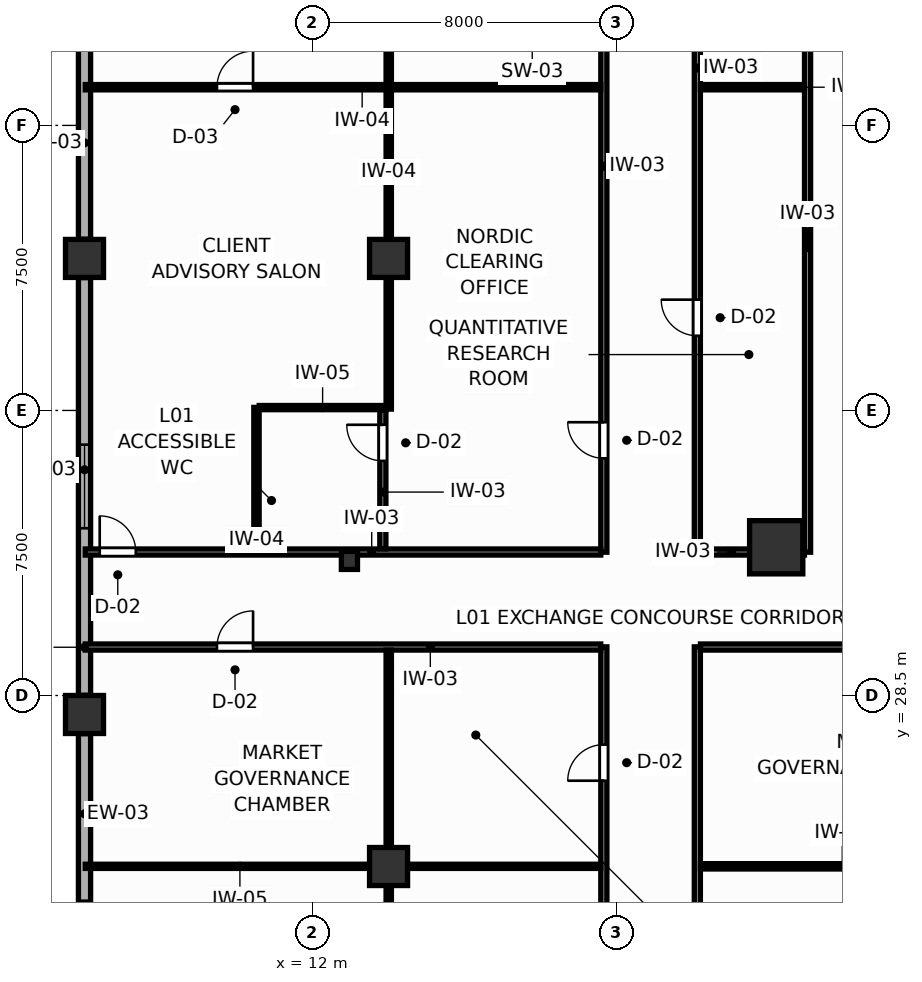
"""IFC4 building model, lengths in metres.
Left out: names, types, materials, properties, quantities, classifications, styles, units other than length and angle.
Written with IfcOpenShell. Run it as: python <this file> out.ifc"""

import sys

from ifc_helpers import new_model, si_unit, direction, frame, frame_2d, origin, origin_2d, place, context, subcontext, project, spatial, rectangle, i_section, extrude, source, transform, mapped, element, fill, save


model = new_model("IFC4")
c1 = context("Model", 3, precision=1e-05, world=origin(), true_north=direction((0.0, 1.0)))
c2 = subcontext(c1, "Body", "Model", "MODEL_VIEW")
j1 = project(units=[si_unit("LENGTHUNIT", "METRE"), si_unit("PLANEANGLEUNIT", "RADIAN")], contexts=[c1])
p1 = place(None, origin())
s1 = spatial("IfcSite", under=j1, at=p1, CompositionType="ELEMENT")
p2 = place(p1, origin())
s2 = spatial("IfcBuilding", under=s1, at=p2, CompositionType="ELEMENT")
p3 = place(p2, frame((0.0, 0.0, 4.8)))
s3 = spatial("IfcBuildingStorey", under=s2, at=p3, CompositionType="ELEMENT", Elevation=4.8)
m1 = source(origin(), c2, "Body", "SweptSolid", [
    extrude(rectangle(XDim=1.4, YDim=1.4, at=origin_2d()), origin(), (0.0, 0.0, 1.0), 4.8),
])
p4 = place(p3, frame((24.2, 32.4, 0.0), z_axis=(0.0, 0.0, 1.0), x_axis=(1.0, 0.0, 0.0)))
e1 = element("IfcColumn", 1, at=p4, inside=s3, PredefinedType="COLUMN", context=c2, shape_type="MappedRepresentation", body=[
    mapped(m1, transform((0.0, 0.0, 0.0), scale=1.0)),
])
m2 = source(origin(), c2, "Body", "SweptSolid", [
    extrude(rectangle(XDim=1.0, YDim=1.0, at=origin_2d()), origin(), (0.0, 0.0, 1.0), 4.8),
])
for number, where, z_axis, x_axis in (
    (2, (6.0, 28.0, 0.0), (0.0, 0.0, 1.0), (1.0, 0.0, 0.0)),
    (3, (6.0, 40.0, 0.0), (0.0, 0.0, 1.0), (1.0, 0.0, 0.0)),
    (4, (14.0, 24.0, 0.0), (0.0, 0.0, 1.0), (1.0, 0.0, 0.0)),
    (5, (14.0, 40.0, 0.0), (0.0, 0.0, 1.0), (1.0, 0.0, 0.0)),
):
    element("IfcColumn", number, at=place(p3, frame(where, z_axis=z_axis, x_axis=x_axis)), inside=s3, PredefinedType="COLUMN", context=c2, shape_type="MappedRepresentation", body=[
        mapped(m2, transform((0.0, 0.0, 0.0), scale=1.0)),
    ])
m3 = source(origin(), c2, "Body", "SweptSolid", [
    extrude(i_section(OverallWidth=0.424, OverallDepth=0.474, WebThickness=0.045, FlangeThickness=0.072, FilletRadius=0.015, at=origin_2d()), origin(), (0.0, 0.0, 1.0), 4.8),
])
p5 = place(p3, frame((12.97, 32.054, 0.0), z_axis=(0.0, 0.0, 1.0), x_axis=(1.0, 0.0, 0.0)))
e6 = element("IfcColumn", 6, at=p5, inside=s3, PredefinedType="COLUMN", context=c2, shape_type="MappedRepresentation", body=[
    mapped(m3, transform((0.0, 0.0, 0.0), scale=1.0)),
])
p6 = place(p3, frame((6.0, 16.505, 0.0), z_axis=(0.0, 0.0, 1.0), x_axis=(0.0, 1.0, 0.0)))
e7 = element("IfcWall", 7, at=p6, inside=s3, PredefinedType="SOLIDWALL", context=c2, shape_type="SweptSolid", body=[
    extrude(rectangle(XDim=10.99, YDim=0.32, at=frame_2d((5.495, 0.0))), origin(), (0.0, 0.0, 1.0), 3.82),
])
p7 = place(p6, frame((4.395, 0.0, 0.75)))
e8 = element("IfcOpeningElement", 8, at=p7, cuts=e7, PredefinedType="OPENING", context=c2, shape_type="SweptSolid", body=[
    extrude(rectangle(XDim=2.2, YDim=2.0, at=frame_2d((1.1, 1.0))), frame((0.0, 0.17, 0.0), z_axis=(0.0, -1.0, 0.0), x_axis=(1.0, 0.0, 0.0)), (0.0, 0.0, 1.0), 0.34),
])
p8 = place(p3, frame((6.0, 28.505, 0.0), z_axis=(0.0, 0.0, 1.0), x_axis=(0.0, 1.0, 0.0)))
e9 = element("IfcWall", 9, at=p8, inside=s3, PredefinedType="SOLIDWALL", context=c2, shape_type="SweptSolid", body=[
    extrude(rectangle(XDim=10.99, YDim=0.32, at=frame_2d((5.495, 0.0))), origin(), (0.0, 0.0, 1.0), 3.82),
])
p9 = place(p8, frame((4.395, 0.0, 0.75)))
e10 = element("IfcOpeningElement", 10, at=p9, cuts=e9, PredefinedType="OPENING", context=c2, shape_type="SweptSolid", body=[
    extrude(rectangle(XDim=2.2, YDim=2.0, at=frame_2d((1.1, 1.0))), frame((0.0, 0.17, 0.0), z_axis=(0.0, -1.0, 0.0), x_axis=(1.0, 0.0, 0.0)), (0.0, 0.0, 1.0), 0.34),
])
p10 = place(p3, frame((6.0, 40.505, 0.0), z_axis=(0.0, 0.0, 1.0), x_axis=(0.0, 1.0, 0.0)))
e11 = element("IfcWall", 11, at=p10, inside=s3, PredefinedType="SOLIDWALL", context=c2, shape_type="SweptSolid", body=[
    extrude(rectangle(XDim=9.47, YDim=0.32, at=frame_2d((4.735, 0.0))), origin(), (0.0, 0.0, 1.0), 3.82),
])
p11 = place(p10, frame((5.253, 0.0, 0.75)))
e12 = element("IfcOpeningElement", 12, at=p11, cuts=e11, PredefinedType="OPENING", context=c2, shape_type="SweptSolid", body=[
    extrude(rectangle(XDim=2.2, YDim=2.0, at=frame_2d((1.1, 1.0))), frame((0.0, 0.17, 0.0), z_axis=(0.0, -1.0, 0.0), x_axis=(1.0, 0.0, 0.0)), (0.0, 0.0, 1.0), 0.34),
])
p12 = place(p3, frame((22.125, 3.02, 0.0), z_axis=(0.0, 0.0, 1.0), x_axis=(0.0, 1.0, 0.0)))
e13 = element("IfcWall", 13, at=p12, inside=s3, PredefinedType="PARTITIONING", context=c2, shape_type="SweptSolid", body=[
    extrude(rectangle(XDim=26.76, YDim=0.16, at=frame_2d((13.38, 0.0))), origin(), (0.0, 0.0, 1.0), 4.52),
])
p13 = place(p12, frame((10.07, 0.0, 0.0)))
e14 = element("IfcOpeningElement", 14, at=p13, cuts=e13, PredefinedType="OPENING", context=c2, shape_type="SweptSolid", body=[
    extrude(rectangle(XDim=0.95, YDim=2.05, at=frame_2d((0.475, 1.025))), frame((0.0, 0.09, 0.0), z_axis=(0.0, -1.0, 0.0), x_axis=(1.0, 0.0, 0.0)), (0.0, 0.0, 1.0), 0.18),
])
p14 = place(p3, frame((19.665, 3.02, 0.0), z_axis=(0.0, 0.0, 1.0), x_axis=(0.0, 1.0, 0.0)))
e15 = element("IfcWall", 15, at=p14, inside=s3, PredefinedType="PARTITIONING", context=c2, shape_type="SweptSolid", body=[
    extrude(rectangle(XDim=26.76, YDim=0.16, at=frame_2d((13.38, 0.0))), origin(), (0.0, 0.0, 1.0), 4.52),
])
p15 = place(p14, frame((6.82, 0.0, 0.0)))
e16 = element("IfcOpeningElement", 16, at=p15, cuts=e15, PredefinedType="OPENING", context=c2, shape_type="SweptSolid", body=[
    extrude(rectangle(XDim=0.95, YDim=2.05, at=frame_2d((0.475, 1.025))), frame((0.0, 0.09, 0.0), z_axis=(0.0, -1.0, 0.0), x_axis=(1.0, 0.0, 0.0)), (0.0, 0.0, 1.0), 0.18),
])
p16 = place(p14, frame((23.238, 0.0, 0.0)))
e17 = element("IfcOpeningElement", 17, at=p16, cuts=e15, PredefinedType="OPENING", context=c2, shape_type="SweptSolid", body=[
    extrude(rectangle(XDim=0.95, YDim=2.05, at=frame_2d((0.475, 1.025))), frame((0.0, 0.09, 0.0), z_axis=(0.0, -1.0, 0.0), x_axis=(1.0, 0.0, 0.0)), (0.0, 0.0, 1.0), 0.18),
])
p17 = place(p3, frame((22.125, 32.27, 0.0), z_axis=(0.0, 0.0, 1.0), x_axis=(0.0, 1.0, 0.0)))
e18 = element("IfcWall", 18, at=p17, inside=s3, PredefinedType="PARTITIONING", context=c2, shape_type="SweptSolid", body=[
    extrude(rectangle(XDim=26.71, YDim=0.16, at=frame_2d((13.355, 0.0))), origin(), (0.0, 0.0, 1.0), 4.52),
])
p18 = place(p17, frame((5.695, 0.0, 0.0)))
e19 = element("IfcOpeningElement", 19, at=p18, cuts=e18, PredefinedType="OPENING", context=c2, shape_type="SweptSolid", body=[
    extrude(rectangle(XDim=0.95, YDim=2.05, at=frame_2d((0.475, 1.025))), frame((0.0, 0.09, 0.0), z_axis=(0.0, -1.0, 0.0), x_axis=(1.0, 0.0, 0.0)), (0.0, 0.0, 1.0), 0.18),
])
p19 = place(p17, frame((18.833, 0.0, 0.0)))
e20 = element("IfcOpeningElement", 20, at=p19, cuts=e18, PredefinedType="OPENING", context=c2, shape_type="SweptSolid", body=[
    extrude(rectangle(XDim=0.95, YDim=2.05, at=frame_2d((0.475, 1.025))), frame((0.0, 0.09, 0.0), z_axis=(0.0, -1.0, 0.0), x_axis=(1.0, 0.0, 0.0)), (0.0, 0.0, 1.0), 0.18),
])
p20 = place(p3, frame((25.025, 32.27, 0.0), z_axis=(0.0, 0.0, 1.0), x_axis=(0.0, 1.0, 0.0)))
e21 = element("IfcWall", 21, at=p20, inside=s3, PredefinedType="PARTITIONING", context=c2, shape_type="SweptSolid", body=[
    extrude(rectangle(XDim=26.71, YDim=0.16, at=frame_2d((13.355, 0.0))), origin(), (0.0, 0.0, 1.0), 4.52),
])
p21 = place(p3, frame((19.665, 32.27, 0.0), z_axis=(0.0, 0.0, 1.0), x_axis=(0.0, 1.0, 0.0)))
e22 = element("IfcWall", 22, at=p21, inside=s3, PredefinedType="PARTITIONING", context=c2, shape_type="SweptSolid", body=[
    extrude(rectangle(XDim=16.71, YDim=0.16, at=frame_2d((8.355, 0.0))), origin(), (0.0, 0.0, 1.0), 4.52),
])
p22 = place(p21, frame((2.47, 0.0, 0.0)))
e23 = element("IfcOpeningElement", 23, at=p22, cuts=e22, PredefinedType="OPENING", context=c2, shape_type="SweptSolid", body=[
    extrude(rectangle(XDim=0.95, YDim=2.05, at=frame_2d((0.475, 1.025))), frame((0.0, 0.09, 0.0), z_axis=(0.0, -1.0, 0.0), x_axis=(1.0, 0.0, 0.0)), (0.0, 0.0, 1.0), 0.18),
])
p23 = place(p3, frame((6.02, 32.275, 0.0), z_axis=(0.0, 0.0, 1.0), x_axis=(1.0, 0.0, 0.0)))
e24 = element("IfcWall", 24, at=p23, inside=s3, PredefinedType="PARTITIONING", context=c2, shape_type="SweptSolid", body=[
    extrude(rectangle(XDim=13.563, YDim=0.16, at=frame_2d((6.781, 0.0))), origin(), (0.0, 0.0, 1.0), 3.82),
])
p24 = place(p23, frame((0.38, 0.0, 0.0)))
e25 = element("IfcOpeningElement", 25, at=p24, cuts=e24, PredefinedType="OPENING", context=c2, shape_type="SweptSolid", body=[
    extrude(rectangle(XDim=0.95, YDim=2.05, at=frame_2d((0.475, 1.025))), frame((0.0, 0.09, 0.0), z_axis=(0.0, -1.0, 0.0), x_axis=(1.0, 0.0, 0.0)), (0.0, 0.0, 1.0), 0.18),
])
p25 = place(p3, frame((6.02, 29.775, 0.0), z_axis=(0.0, 0.0, 1.0), x_axis=(1.0, 0.0, 0.0)))
e26 = element("IfcWall", 26, at=p25, inside=s3, PredefinedType="PARTITIONING", context=c2, shape_type="SweptSolid", body=[
    extrude(rectangle(XDim=13.563, YDim=0.16, at=frame_2d((6.781, 0.0))), origin(), (0.0, 0.0, 1.0), 4.52),
])
p26 = place(p25, frame((3.465, 0.0, 0.0)))
e27 = element("IfcOpeningElement", 27, at=p26, cuts=e26, PredefinedType="OPENING", context=c2, shape_type="SweptSolid", body=[
    extrude(rectangle(XDim=0.95, YDim=2.05, at=frame_2d((0.475, 1.025))), frame((0.0, 0.09, 0.0), z_axis=(0.0, -1.0, 0.0), x_axis=(1.0, 0.0, 0.0)), (0.0, 0.0, 1.0), 0.18),
])
p27 = place(p3, frame((22.207, 29.775, 0.0), z_axis=(0.0, 0.0, 1.0), x_axis=(1.0, 0.0, 0.0)))
e28 = element("IfcWall", 28, at=p27, inside=s3, PredefinedType="PARTITIONING", context=c2, shape_type="SweptSolid", body=[
    extrude(rectangle(XDim=12.436, YDim=0.16, at=frame_2d((6.218, 0.0))), origin(), (0.0, 0.0, 1.0), 4.52),
])
p28 = place(p27, frame((7.338, 0.0, 0.0)))
e29 = element("IfcOpeningElement", 29, at=p28, cuts=e28, PredefinedType="OPENING", context=c2, shape_type="SweptSolid", body=[
    extrude(rectangle(XDim=0.95, YDim=2.05, at=frame_2d((0.475, 1.025))), frame((0.0, 0.09, 0.0), z_axis=(0.0, -1.0, 0.0), x_axis=(1.0, 0.0, 0.0)), (0.0, 0.0, 1.0), 0.18),
])
p29 = place(p3, frame((13.85, 32.357, 0.0), z_axis=(0.0, 0.0, 1.0), x_axis=(0.0, 1.0, 0.0)))
e30 = element("IfcWall", 30, at=p29, inside=s3, PredefinedType="PARTITIONING", context=c2, shape_type="SweptSolid", body=[
    extrude(rectangle(XDim=3.646, YDim=0.16, at=frame_2d((1.823, 0.0))), origin(), (0.0, 0.0, 1.0), 3.82),
])
p30 = place(p29, frame((2.316, 0.0, 0.0)))
e31 = element("IfcOpeningElement", 31, at=p30, cuts=e30, PredefinedType="OPENING", context=c2, shape_type="SweptSolid", body=[
    extrude(rectangle(XDim=0.95, YDim=2.05, at=frame_2d((0.475, 1.025))), frame((0.0, 0.09, 0.0), z_axis=(0.0, -1.0, 0.0), x_axis=(1.0, 0.0, 0.0)), (0.0, 0.0, 1.0), 0.18),
])
p31 = place(p3, frame((22.207, 32.275, 0.0), z_axis=(0.0, 0.0, 1.0), x_axis=(1.0, 0.0, 0.0)))
e32 = element("IfcWall", 32, at=p31, inside=s3, PredefinedType="PARTITIONING", context=c2, shape_type="SweptSolid", body=[
    extrude(rectangle(XDim=2.736, YDim=0.16, at=frame_2d((1.368, 0.0))), origin(), (0.0, 0.0, 1.0), 3.82),
])
p32 = place(p3, frame((14.005, 3.02, 0.0), z_axis=(0.0, 0.0, 1.0), x_axis=(0.0, 1.0, 0.0)))
e33 = element("IfcWall", 33, at=p32, inside=s3, PredefinedType="PARTITIONING", context=c2, shape_type="SweptSolid", body=[
    extrude(rectangle(XDim=26.673, YDim=0.14, at=frame_2d((13.336, 0.0))), origin(), (0.0, 0.0, 1.0), 3.82),
])
p33 = place(p32, frame((10.07, 0.0, 0.0)))
e34 = element("IfcOpeningElement", 34, at=p33, cuts=e33, PredefinedType="OPENING", context=c2, shape_type="SweptSolid", body=[
    extrude(rectangle(XDim=0.95, YDim=2.05, at=frame_2d((0.475, 1.025))), frame((0.0, 0.08, 0.0), z_axis=(0.0, -1.0, 0.0), x_axis=(1.0, 0.0, 0.0)), (0.0, 0.0, 1.0), 0.16),
])
p34 = place(p3, frame((14.005, 36.035, 0.0), z_axis=(0.0, 0.0, 1.0), x_axis=(0.0, 1.0, 0.0)))
e35 = element("IfcWall", 35, at=p34, inside=s3, PredefinedType="PARTITIONING", context=c2, shape_type="SweptSolid", body=[
    extrude(rectangle(XDim=22.945, YDim=0.14, at=frame_2d((11.473, 0.0))), origin(), (0.0, 0.0, 1.0), 3.82),
])
p35 = place(p34, frame((18.052, 0.0, 0.0)))
e36 = element("IfcOpeningElement", 36, at=p35, cuts=e35, PredefinedType="OPENING", context=c2, shape_type="SweptSolid", body=[
    extrude(rectangle(XDim=0.95, YDim=2.05, at=frame_2d((0.475, 1.025))), frame((0.0, 0.08, 0.0), z_axis=(0.0, -1.0, 0.0), x_axis=(1.0, 0.0, 0.0)), (0.0, 0.0, 1.0), 0.16),
])
p36 = place(p3, frame((6.02, 24.005, 0.0), z_axis=(0.0, 0.0, 1.0), x_axis=(1.0, 0.0, 0.0)))
e37 = element("IfcWall", 37, at=p36, inside=s3, PredefinedType="MOVABLE", context=c2, shape_type="SweptSolid", body=[
    extrude(rectangle(XDim=13.563, YDim=0.11, at=frame_2d((6.781, 0.0))), origin(), (0.0, 0.0, 1.0), 3.92),
])
p37 = place(p3, frame((6.02, 44.505, 0.0), z_axis=(0.0, 0.0, 1.0), x_axis=(1.0, 0.0, 0.0)))
e38 = element("IfcWall", 38, at=p37, inside=s3, PredefinedType="PARTITIONING", context=c2, shape_type="SweptSolid", body=[
    extrude(rectangle(XDim=13.563, YDim=0.14, at=frame_2d((6.781, 0.0))), origin(), (0.0, 0.0, 1.0), 4.52),
])
p38 = place(p37, frame((3.465, 0.0, 0.0)))
e39 = element("IfcOpeningElement", 39, at=p38, cuts=e38, PredefinedType="OPENING", context=c2, shape_type="SweptSolid", body=[
    extrude(rectangle(XDim=0.95, YDim=2.05, at=frame_2d((0.475, 1.025))), frame((0.0, 0.08, 0.0), z_axis=(0.0, -1.0, 0.0), x_axis=(1.0, 0.0, 0.0)), (0.0, 0.0, 1.0), 0.16),
])
p39 = place(p3, frame((22.207, 24.005, 0.0), z_axis=(0.0, 0.0, 1.0), x_axis=(1.0, 0.0, 0.0)))
e40 = element("IfcWall", 40, at=p39, inside=s3, PredefinedType="PARTITIONING", context=c2, shape_type="SweptSolid", body=[
    extrude(rectangle(XDim=12.436, YDim=0.14, at=frame_2d((6.218, 0.0))), origin(), (0.0, 0.0, 1.0), 3.92),
])
p40 = place(p3, frame((10.525, 32.357, 0.0), z_axis=(0.0, 0.0, 1.0), x_axis=(0.0, 1.0, 0.0)))
e41 = element("IfcWall", 41, at=p40, inside=s3, PredefinedType="PARTITIONING", context=c2, shape_type="SweptSolid", body=[
    extrude(rectangle(XDim=3.723, YDim=0.14, at=frame_2d((1.862, 0.0))), origin(), (0.0, 0.0, 1.0), 4.52),
])
p41 = place(p3, frame((10.597, 36.075, 0.0), z_axis=(0.0, 0.0, 1.0), x_axis=(1.0, 0.0, 0.0)))
e42 = element("IfcWall", 42, at=p41, inside=s3, PredefinedType="MOVABLE", context=c2, shape_type="SweptSolid", body=[
    extrude(rectangle(XDim=3.336, YDim=0.11, at=frame_2d((1.668, 0.0))), origin(), (0.0, 0.0, 1.0), 4.52),
])
p42 = place(p3, frame((22.207, 44.505, 0.0), z_axis=(0.0, 0.0, 1.0), x_axis=(1.0, 0.0, 0.0)))
e43 = element("IfcWall", 43, at=p42, inside=s3, PredefinedType="PARTITIONING", context=c2, shape_type="SweptSolid", body=[
    extrude(rectangle(XDim=2.736, YDim=0.14, at=frame_2d((1.368, 0.0))), origin(), (0.0, 0.0, 1.0), 4.52),
])
p43 = place(p7, origin())
e44 = element("IfcWindow", 44, at=p43, inside=s3, PartitioningType="SINGLE_PANEL", PredefinedType="WINDOW", context=c2, shape_type="SweptSolid", body=[
    extrude(rectangle(XDim=2.2, YDim=2.0, at=frame_2d((1.1, 1.0))), frame((0.0, 0.03, 0.0), z_axis=(0.0, -1.0, 0.0), x_axis=(1.0, 0.0, 0.0)), (0.0, 0.0, 1.0), 0.06),
])
fill(e8, e44)
p44 = place(p9, origin())
e45 = element("IfcWindow", 45, at=p44, inside=s3, PartitioningType="SINGLE_PANEL", PredefinedType="WINDOW", context=c2, shape_type="SweptSolid", body=[
    extrude(rectangle(XDim=2.2, YDim=2.0, at=frame_2d((1.1, 1.0))), frame((0.0, 0.03, 0.0), z_axis=(0.0, -1.0, 0.0), x_axis=(1.0, 0.0, 0.0)), (0.0, 0.0, 1.0), 0.06),
])
fill(e10, e45)
p45 = place(p16, origin())
e46 = element("IfcDoor", 46, at=p45, inside=s3, OperationType="SINGLE_SWING_LEFT", PredefinedType="DOOR", context=c2, shape_type="SweptSolid", body=[
    extrude(rectangle(XDim=0.95, YDim=2.05, at=frame_2d((0.475, 1.025))), frame((0.0, 0.025, 0.0), z_axis=(0.0, -1.0, 0.0), x_axis=(1.0, 0.0, 0.0)), (0.0, 0.0, 1.0), 0.05),
])
fill(e17, e46)
p46 = place(p18, origin())
e47 = element("IfcDoor", 47, at=p46, inside=s3, OperationType="SINGLE_SWING_RIGHT", PredefinedType="DOOR", context=c2, shape_type="SweptSolid", body=[
    extrude(rectangle(XDim=0.95, YDim=2.05, at=frame_2d((0.475, 1.025))), frame((0.0, 0.025, 0.0), z_axis=(0.0, -1.0, 0.0), x_axis=(1.0, 0.0, 0.0)), (0.0, 0.0, 1.0), 0.05),
])
fill(e19, e47)
p47 = place(p22, origin())
e48 = element("IfcDoor", 48, at=p47, inside=s3, OperationType="SINGLE_SWING_RIGHT", PredefinedType="DOOR", context=c2, shape_type="SweptSolid", body=[
    extrude(rectangle(XDim=0.95, YDim=2.05, at=frame_2d((0.475, 1.025))), frame((0.0, 0.025, 0.0), z_axis=(0.0, -1.0, 0.0), x_axis=(1.0, 0.0, 0.0)), (0.0, 0.0, 1.0), 0.05),
])
fill(e23, e48)
p48 = place(p24, origin())
e49 = element("IfcDoor", 49, at=p48, inside=s3, OperationType="SINGLE_SWING_LEFT", PredefinedType="DOOR", context=c2, shape_type="SweptSolid", body=[
    extrude(rectangle(XDim=0.95, YDim=2.05, at=frame_2d((0.475, 1.025))), frame((0.0, 0.025, 0.0), z_axis=(0.0, -1.0, 0.0), x_axis=(1.0, 0.0, 0.0)), (0.0, 0.0, 1.0), 0.05),
])
fill(e25, e49)
p49 = place(p26, origin())
e50 = element("IfcDoor", 50, at=p49, inside=s3, OperationType="SINGLE_SWING_RIGHT", PredefinedType="DOOR", context=c2, shape_type="SweptSolid", body=[
    extrude(rectangle(XDim=0.95, YDim=2.05, at=frame_2d((0.475, 1.025))), frame((0.0, 0.025, 0.0), z_axis=(0.0, -1.0, 0.0), x_axis=(1.0, 0.0, 0.0)), (0.0, 0.0, 1.0), 0.05),
])
fill(e27, e50)
p50 = place(p30, origin())
e51 = element("IfcDoor", 51, at=p50, inside=s3, OperationType="SINGLE_SWING_RIGHT", PredefinedType="DOOR", context=c2, shape_type="SweptSolid", body=[
    extrude(rectangle(XDim=0.95, YDim=2.05, at=frame_2d((0.475, 1.025))), frame((0.0, 0.025, 0.0), z_axis=(0.0, -1.0, 0.0), x_axis=(1.0, 0.0, 0.0)), (0.0, 0.0, 1.0), 0.05),
])
fill(e31, e51)
p51 = place(p38, origin())
e52 = element("IfcDoor", 52, at=p51, inside=s3, OperationType="SINGLE_SWING_RIGHT", PredefinedType="DOOR", context=c2, shape_type="SweptSolid", body=[
    extrude(rectangle(XDim=0.95, YDim=2.05, at=frame_2d((0.475, 1.025))), frame((0.0, 0.025, 0.0), z_axis=(0.0, -1.0, 0.0), x_axis=(1.0, 0.0, 0.0)), (0.0, 0.0, 1.0), 0.05),
])
fill(e39, e52)
save(model, sys.argv[1])
